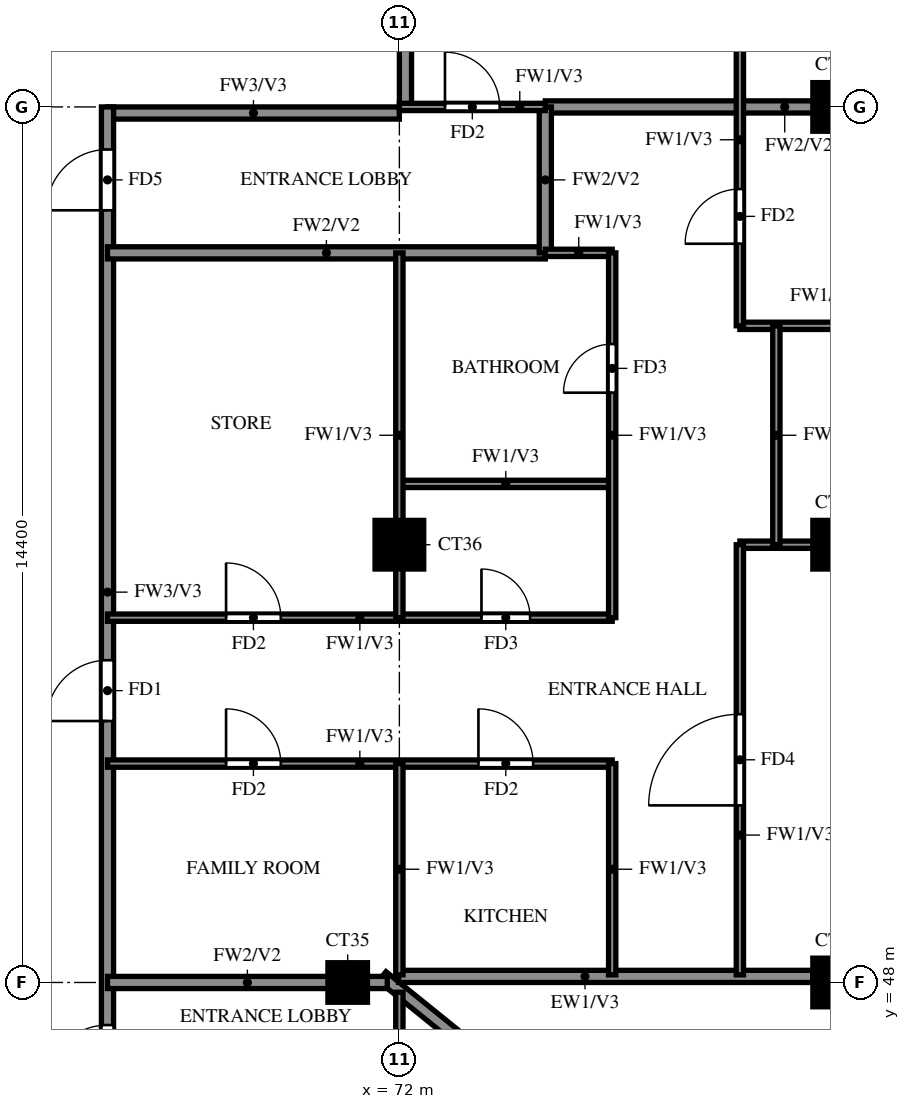
"""IFC4 building model, lengths in metres.
Left out: names, types, materials, properties, quantities, classifications, styles, units other than length and angle.
Written with IfcOpenShell. Run it as: python <this file> out.ifc"""

import sys

from ifc_helpers import new_model, si_unit, direction, frame, frame_2d, origin, origin_2d, place, context, subcontext, project, spatial, rectangle, extrude, source, transform, mapped, element, fill, save


model = new_model("IFC4")
c1 = context("Model", 3, precision=1e-05, world=origin(), true_north=direction((0.0, 1.0)))
c2 = subcontext(c1, "Body", "Model", "MODEL_VIEW")
j1 = project(units=[si_unit("LENGTHUNIT", "METRE"), si_unit("PLANEANGLEUNIT", "RADIAN")], contexts=[c1])
p1 = place(None, origin())
s1 = spatial("IfcSite", under=j1, at=p1, CompositionType="ELEMENT")
p2 = place(p1, origin())
s2 = spatial("IfcBuilding", under=s1, at=p2, CompositionType="ELEMENT")
p3 = place(p2, frame((0.0, 0.0, 232.5)))
s3 = spatial("IfcBuildingStorey", under=s2, at=p3, CompositionType="ELEMENT", Elevation=232.5)
m1 = source(origin(), c2, "Body", "SweptSolid", [
    extrude(rectangle(XDim=0.65, YDim=0.65, at=origin_2d()), origin(), (0.0, 0.0, 1.0), 3.22),
])
p4 = place(p3, frame((71.15, 48.0, 0.0), z_axis=(0.0, 0.0, 1.0), x_axis=(1.0, 0.0, 0.0)))
e1 = element("IfcColumn", 1, at=p4, inside=s3, PredefinedType="COLUMN", context=c2, shape_type="MappedRepresentation", body=[
    mapped(m1, transform((0.0, 0.0, 0.0))),
])
m2 = source(origin(), c2, "Body", "SweptSolid", [
    extrude(rectangle(XDim=0.8, YDim=0.8, at=origin_2d()), origin(), (0.0, 0.0, 1.0), 3.22),
])
for number, where, z_axis, x_axis in (
    (2, (79.2, 48.0, 0.0), (0.0, 0.0, 1.0), (1.0, 0.0, 0.0)),
    (3, (72.0, 55.2, 0.0), (0.0, 0.0, 1.0), (1.0, 0.0, 0.0)),
    (4, (79.2, 55.2, 0.0), (0.0, 0.0, 1.0), (1.0, 0.0, 0.0)),
    (5, (79.2, 62.4, 0.0), (0.0, 0.0, 1.0), (1.0, 0.0, 0.0)),
):
    element("IfcColumn", number, at=place(p3, frame(where, z_axis=z_axis, x_axis=x_axis)), inside=s3, PredefinedType="COLUMN", context=c2, shape_type="MappedRepresentation", body=[
        mapped(m2, transform((0.0, 0.0, 0.0))),
    ])
p5 = place(p3, frame((81.907, 39.87, 0.0), z_axis=(0.0, 0.0, 1.0), x_axis=(-0.777936274417, 0.62834318087, 0.0)))
e6 = element("IfcWall", 6, at=p5, inside=s3, PredefinedType="SOLIDWALL", context=c2, shape_type="SweptSolid", body=[
    extrude(rectangle(XDim=13.099, YDim=0.2, at=frame_2d((6.549, 0.0))), origin(), (0.0, 0.0, 1.0), 3.22),
])
p6 = place(p5, frame((9.938, 0.0, 1.5)))
e7 = element("IfcOpeningElement", 7, at=p6, cuts=e6, PredefinedType="OPENING", context=c2, shape_type="SweptSolid", body=[
    extrude(rectangle(XDim=0.9, YDim=0.9, at=frame_2d((0.45, 0.45))), frame((0.0, 0.11, 0.0), z_axis=(0.0, -1.0, 0.0), x_axis=(1.0, 0.0, 0.0)), (0.0, 0.0, 1.0), 0.22),
])
p7 = place(p3, frame((71.987, 48.1, 0.0), z_axis=(0.0, 0.0, 1.0), x_axis=(1.0, 0.0, 0.0)))
e8 = element("IfcWall", 8, at=p7, inside=s3, PredefinedType="SOLIDWALL", context=c2, shape_type="SweptSolid", body=[
    extrude(rectangle(XDim=6.813, YDim=0.2, at=frame_2d((3.406, 0.0))), origin(), (0.0, 0.0, 1.0), 3.22),
])
p8 = place(p3, frame((67.2, 62.3, 0.0), z_axis=(0.0, 0.0, 1.0), x_axis=(1.0, 0.0, 0.0)))
e9 = element("IfcWall", 9, at=p8, inside=s3, PredefinedType="SOLIDWALL", context=c2, shape_type="SweptSolid", body=[
    extrude(rectangle(XDim=4.8, YDim=0.2, at=frame_2d((2.4, 0.0))), origin(), (0.0, 0.0, 1.0), 3.22),
])
p9 = place(p3, frame((67.2, 45.6, 0.0), z_axis=(0.0, 0.0, 1.0), x_axis=(0.0, 1.0, 0.0)))
e10 = element("IfcWall", 10, at=p9, inside=s3, PredefinedType="SOLIDWALL", context=c2, shape_type="SweptSolid", body=[
    extrude(rectangle(XDim=16.8, YDim=0.2, at=frame_2d((8.4, 0.0))), origin(), (0.0, 0.0, 1.0), 3.22),
])
p10 = place(p9, frame((6.7, 0.0, 0.0)))
e11 = element("IfcOpeningElement", 11, at=p10, cuts=e10, PredefinedType="OPENING", context=c2, shape_type="SweptSolid", body=[
    extrude(rectangle(XDim=1.0, YDim=2.1, at=frame_2d((0.5, 1.05))), frame((0.0, 0.11, 0.0), z_axis=(0.0, -1.0, 0.0), x_axis=(1.0, 0.0, 0.0)), (0.0, 0.0, 1.0), 0.22),
])
p11 = place(p9, frame((15.1, 0.0, 0.0)))
e12 = element("IfcOpeningElement", 12, at=p11, cuts=e10, PredefinedType="OPENING", context=c2, shape_type="SweptSolid", body=[
    extrude(rectangle(XDim=1.0, YDim=2.1, at=frame_2d((0.5, 1.05))), frame((0.0, 0.11, 0.0), z_axis=(0.0, -1.0, 0.0), x_axis=(1.0, 0.0, 0.0)), (0.0, 0.0, 1.0), 0.22),
])
p12 = place(p9, frame((0.7, 0.0, 0.0)))
e13 = element("IfcOpeningElement", 13, at=p12, cuts=e10, PredefinedType="OPENING", context=c2, shape_type="SweptSolid", body=[
    extrude(rectangle(XDim=1.0, YDim=2.1, at=frame_2d((0.5, 1.05))), frame((0.0, 0.11, 0.0), z_axis=(0.0, -1.0, 0.0), x_axis=(1.0, 0.0, 0.0)), (0.0, 0.0, 1.0), 0.22),
])
p13 = place(p3, frame((72.1, 62.4, 0.0), z_axis=(0.0, 0.0, 1.0), x_axis=(0.0, 1.0, 0.0)))
e14 = element("IfcWall", 14, at=p13, inside=s3, PredefinedType="SOLIDWALL", context=c2, shape_type="SweptSolid", body=[
    extrude(rectangle(XDim=15.6, YDim=0.2, at=frame_2d((7.8, 0.0))), origin(), (0.0, 0.0, 1.0), 3.22),
])
p14 = place(p3, frame((67.2, 48.0, 0.0), z_axis=(0.0, 0.0, 1.0), x_axis=(1.0, 0.0, 0.0)))
e15 = element("IfcWall", 15, at=p14, inside=s3, PredefinedType="SOLIDWALL", context=c2, shape_type="SweptSolid", body=[
    extrude(rectangle(XDim=4.601, YDim=0.2, at=frame_2d((2.301, 0.0))), origin(), (0.0, 0.0, 1.0), 3.22),
])
p15 = place(p3, frame((67.2, 60.0, 0.0), z_axis=(0.0, 0.0, 1.0), x_axis=(1.0, 0.0, 0.0)))
e16 = element("IfcWall", 16, at=p15, inside=s3, PredefinedType="SOLIDWALL", context=c2, shape_type="SweptSolid", body=[
    extrude(rectangle(XDim=7.2, YDim=0.2, at=frame_2d((3.6, 0.0))), origin(), (0.0, 0.0, 1.0), 3.22),
])
p16 = place(p3, frame((74.4, 62.4, 0.0), z_axis=(0.0, 0.0, 1.0), x_axis=(1.0, 0.0, 0.0)))
e17 = element("IfcWall", 17, at=p16, inside=s3, PredefinedType="SOLIDWALL", context=c2, shape_type="SweptSolid", body=[
    extrude(rectangle(XDim=7.875, YDim=0.2, at=frame_2d((3.938, 0.0))), origin(), (0.0, 0.0, 1.0), 3.22),
])
p17 = place(p3, frame((74.4, 60.0, 0.0), z_axis=(0.0, 0.0, 1.0), x_axis=(0.0, 1.0, 0.0)))
e18 = element("IfcWall", 18, at=p17, inside=s3, PredefinedType="SOLIDWALL", context=c2, shape_type="SweptSolid", body=[
    extrude(rectangle(XDim=2.4, YDim=0.2, at=frame_2d((1.2, 0.0))), origin(), (0.0, 0.0, 1.0), 3.22),
])
p18 = place(p3, frame((67.2, 51.6, 0.0), z_axis=(0.0, 0.0, 1.0), x_axis=(1.0, 0.0, 0.0)))
e19 = element("IfcWall", 19, at=p18, inside=s3, PredefinedType="PARTITIONING", context=c2, shape_type="SweptSolid", body=[
    extrude(rectangle(XDim=8.3, YDim=0.12, at=frame_2d((4.15, 0.0))), origin(), (0.0, 0.0, 1.0), 3.22),
])
p19 = place(p18, frame((6.1, 0.0, 0.0)))
e20 = element("IfcOpeningElement", 20, at=p19, cuts=e19, PredefinedType="OPENING", context=c2, shape_type="SweptSolid", body=[
    extrude(rectangle(XDim=0.9, YDim=2.1, at=frame_2d((0.45, 1.05))), frame((0.0, 0.07, 0.0), z_axis=(0.0, -1.0, 0.0), x_axis=(1.0, 0.0, 0.0)), (0.0, 0.0, 1.0), 0.14),
])
p20 = place(p18, frame((1.95, 0.0, 0.0)))
e21 = element("IfcOpeningElement", 21, at=p20, cuts=e19, PredefinedType="OPENING", context=c2, shape_type="SweptSolid", body=[
    extrude(rectangle(XDim=0.9, YDim=2.1, at=frame_2d((0.45, 1.05))), frame((0.0, 0.07, 0.0), z_axis=(0.0, -1.0, 0.0), x_axis=(1.0, 0.0, 0.0)), (0.0, 0.0, 1.0), 0.14),
])
p21 = place(p3, frame((67.2, 54.0, 0.0), z_axis=(0.0, 0.0, 1.0), x_axis=(1.0, 0.0, 0.0)))
e22 = element("IfcWall", 22, at=p21, inside=s3, PredefinedType="PARTITIONING", context=c2, shape_type="SweptSolid", body=[
    extrude(rectangle(XDim=8.3, YDim=0.12, at=frame_2d((4.15, 0.0))), origin(), (0.0, 0.0, 1.0), 3.22),
])
p22 = place(p21, frame((6.15, 0.0, 0.0)))
e23 = element("IfcOpeningElement", 23, at=p22, cuts=e22, PredefinedType="OPENING", context=c2, shape_type="SweptSolid", body=[
    extrude(rectangle(XDim=0.8, YDim=2.1, at=frame_2d((0.4, 1.05))), frame((0.0, 0.07, 0.0), z_axis=(0.0, -1.0, 0.0), x_axis=(1.0, 0.0, 0.0)), (0.0, 0.0, 1.0), 0.14),
])
p23 = place(p21, frame((1.95, 0.0, 0.0)))
e24 = element("IfcOpeningElement", 24, at=p23, cuts=e22, PredefinedType="OPENING", context=c2, shape_type="SweptSolid", body=[
    extrude(rectangle(XDim=0.9, YDim=2.1, at=frame_2d((0.45, 1.05))), frame((0.0, 0.07, 0.0), z_axis=(0.0, -1.0, 0.0), x_axis=(1.0, 0.0, 0.0)), (0.0, 0.0, 1.0), 0.14),
])
p24 = place(p3, frame((77.6, 55.2, 0.0), z_axis=(0.0, 0.0, 1.0), x_axis=(1.0, 0.0, 0.0)))
e25 = element("IfcWall", 25, at=p24, inside=s3, PredefinedType="PARTITIONING", context=c2, shape_type="SweptSolid", body=[
    extrude(rectangle(XDim=4.675, YDim=0.12, at=frame_2d((2.337, 0.0))), origin(), (0.0, 0.0, 1.0), 3.22),
])
p25 = place(p3, frame((72.0, 56.2, 0.0), z_axis=(0.0, 0.0, 1.0), x_axis=(1.0, 0.0, 0.0)))
e26 = element("IfcWall", 26, at=p25, inside=s3, PredefinedType="PARTITIONING", context=c2, shape_type="SweptSolid", body=[
    extrude(rectangle(XDim=3.5, YDim=0.12, at=frame_2d((1.75, 0.0))), origin(), (0.0, 0.0, 1.0), 3.22),
])
p26 = place(p3, frame((77.6, 58.8, 0.0), z_axis=(0.0, 0.0, 1.0), x_axis=(1.0, 0.0, 0.0)))
e27 = element("IfcWall", 27, at=p26, inside=s3, PredefinedType="PARTITIONING", context=c2, shape_type="SweptSolid", body=[
    extrude(rectangle(XDim=4.675, YDim=0.12, at=frame_2d((2.337, 0.0))), origin(), (0.0, 0.0, 1.0), 2.32),
])
p27 = place(p26, frame((2.238, 0.0, 0.0)))
e28 = element("IfcOpeningElement", 28, at=p27, cuts=e27, PredefinedType="OPENING", context=c2, shape_type="SweptSolid", body=[
    extrude(rectangle(XDim=0.8, YDim=2.1, at=frame_2d((0.4, 1.05))), frame((0.0, 0.07, 0.0), z_axis=(0.0, -1.0, 0.0), x_axis=(1.0, 0.0, 0.0)), (0.0, 0.0, 1.0), 0.14),
])
p28 = place(p3, frame((74.4, 60.0, 0.0), z_axis=(0.0, 0.0, 1.0), x_axis=(1.0, 0.0, 0.0)))
e29 = element("IfcWall", 29, at=p28, inside=s3, PredefinedType="PARTITIONING", context=c2, shape_type="SweptSolid", body=[
    extrude(rectangle(XDim=1.1, YDim=0.12, at=frame_2d((0.55, 0.0))), origin(), (0.0, 0.0, 1.0), 3.22),
])
p29 = place(p3, frame((72.0, 62.4, 0.0), z_axis=(0.0, 0.0, 1.0), x_axis=(1.0, 0.0, 0.0)))
e30 = element("IfcWall", 30, at=p29, inside=s3, PredefinedType="PARTITIONING", context=c2, shape_type="SweptSolid", body=[
    extrude(rectangle(XDim=2.4, YDim=0.12, at=frame_2d((1.2, 0.0))), origin(), (0.0, 0.0, 1.0), 3.22),
])
p30 = place(p29, frame((0.75, 0.0, 0.0)))
e31 = element("IfcOpeningElement", 31, at=p30, cuts=e30, PredefinedType="OPENING", context=c2, shape_type="SweptSolid", body=[
    extrude(rectangle(XDim=0.9, YDim=2.1, at=frame_2d((0.45, 1.05))), frame((0.0, 0.07, 0.0), z_axis=(0.0, -1.0, 0.0), x_axis=(1.0, 0.0, 0.0)), (0.0, 0.0, 1.0), 0.14),
])
p31 = place(p3, frame((72.0, 39.725, 0.0), z_axis=(0.0, 0.0, 1.0), x_axis=(0.0, 1.0, 0.0)))
e32 = element("IfcWall", 32, at=p31, inside=s3, PredefinedType="PARTITIONING", context=c2, shape_type="SweptSolid", body=[
    extrude(rectangle(XDim=8.114, YDim=0.12, at=frame_2d((4.057, 0.0))), origin(), (0.0, 0.0, 1.0), 2.32),
])
p32 = place(p31, frame((1.788, 0.0, 0.0)))
e33 = element("IfcOpeningElement", 33, at=p32, cuts=e32, PredefinedType="OPENING", context=c2, shape_type="SweptSolid", body=[
    extrude(rectangle(XDim=1.5, YDim=2.1, at=frame_2d((0.75, 1.05))), frame((0.0, 0.07, 0.0), z_axis=(0.0, -1.0, 0.0), x_axis=(1.0, 0.0, 0.0)), (0.0, 0.0, 1.0), 0.14),
])
p33 = place(p31, frame((4.575, 0.0, 0.0)))
e34 = element("IfcOpeningElement", 34, at=p33, cuts=e32, PredefinedType="OPENING", context=c2, shape_type="SweptSolid", body=[
    extrude(rectangle(XDim=0.8, YDim=2.1, at=frame_2d((0.4, 1.05))), frame((0.0, 0.07, 0.0), z_axis=(0.0, -1.0, 0.0), x_axis=(1.0, 0.0, 0.0)), (0.0, 0.0, 1.0), 0.14),
])
p34 = place(p3, frame((72.0, 48.125, 0.0), z_axis=(0.0, 0.0, 1.0), x_axis=(0.0, 1.0, 0.0)))
e35 = element("IfcWall", 35, at=p34, inside=s3, PredefinedType="PARTITIONING", context=c2, shape_type="SweptSolid", body=[
    extrude(rectangle(XDim=3.475, YDim=0.12, at=frame_2d((1.738, 0.0))), origin(), (0.0, 0.0, 1.0), 3.22),
])
p35 = place(p3, frame((72.0, 54.0, 0.0), z_axis=(0.0, 0.0, 1.0), x_axis=(0.0, 1.0, 0.0)))
e36 = element("IfcWall", 36, at=p35, inside=s3, PredefinedType="PARTITIONING", context=c2, shape_type="SweptSolid", body=[
    extrude(rectangle(XDim=6.0, YDim=0.12, at=frame_2d((3.0, 0.0))), origin(), (0.0, 0.0, 1.0), 3.22),
])
p36 = place(p3, frame((75.5, 48.125, 0.0), z_axis=(0.0, 0.0, 1.0), x_axis=(0.0, 1.0, 0.0)))
e37 = element("IfcWall", 37, at=p36, inside=s3, PredefinedType="PARTITIONING", context=c2, shape_type="SweptSolid", body=[
    extrude(rectangle(XDim=3.475, YDim=0.12, at=frame_2d((1.738, 0.0))), origin(), (0.0, 0.0, 1.0), 3.22),
])
p37 = place(p3, frame((75.5, 54.0, 0.0), z_axis=(0.0, 0.0, 1.0), x_axis=(0.0, 1.0, 0.0)))
e38 = element("IfcWall", 38, at=p37, inside=s3, PredefinedType="PARTITIONING", context=c2, shape_type="SweptSolid", body=[
    extrude(rectangle(XDim=6.0, YDim=0.12, at=frame_2d((3.0, 0.0))), origin(), (0.0, 0.0, 1.0), 3.22),
])
p38 = place(p37, frame((3.7, 0.0, 0.0)))
e39 = element("IfcOpeningElement", 39, at=p38, cuts=e38, PredefinedType="OPENING", context=c2, shape_type="SweptSolid", body=[
    extrude(rectangle(XDim=0.8, YDim=2.1, at=frame_2d((0.4, 1.05))), frame((0.0, 0.07, 0.0), z_axis=(0.0, -1.0, 0.0), x_axis=(1.0, 0.0, 0.0)), (0.0, 0.0, 1.0), 0.14),
])
p39 = place(p3, frame((77.6, 48.125, 0.0), z_axis=(0.0, 0.0, 1.0), x_axis=(0.0, 1.0, 0.0)))
e40 = element("IfcWall", 40, at=p39, inside=s3, PredefinedType="PARTITIONING", context=c2, shape_type="SweptSolid", body=[
    extrude(rectangle(XDim=7.075, YDim=0.12, at=frame_2d((3.538, 0.0))), origin(), (0.0, 0.0, 1.0), 3.22),
])
p40 = place(p39, frame((2.788, 0.0, 0.0)))
e41 = element("IfcOpeningElement", 41, at=p40, cuts=e40, PredefinedType="OPENING", context=c2, shape_type="SweptSolid", body=[
    extrude(rectangle(XDim=1.5, YDim=2.1, at=frame_2d((0.75, 1.05))), frame((0.0, 0.07, 0.0), z_axis=(0.0, -1.0, 0.0), x_axis=(1.0, 0.0, 0.0)), (0.0, 0.0, 1.0), 0.14),
])
p41 = place(p3, frame((77.6, 58.8, 0.0), z_axis=(0.0, 0.0, 1.0), x_axis=(0.0, 1.0, 0.0)))
e42 = element("IfcWall", 42, at=p41, inside=s3, PredefinedType="PARTITIONING", context=c2, shape_type="SweptSolid", body=[
    extrude(rectangle(XDim=7.2, YDim=0.12, at=frame_2d((3.6, 0.0))), origin(), (0.0, 0.0, 1.0), 3.22),
])
p42 = place(p41, frame((1.35, 0.0, 0.0)))
e43 = element("IfcOpeningElement", 43, at=p42, cuts=e42, PredefinedType="OPENING", context=c2, shape_type="SweptSolid", body=[
    extrude(rectangle(XDim=0.9, YDim=2.1, at=frame_2d((0.45, 1.05))), frame((0.0, 0.07, 0.0), z_axis=(0.0, -1.0, 0.0), x_axis=(1.0, 0.0, 0.0)), (0.0, 0.0, 1.0), 0.14),
])
p43 = place(p41, frame((4.95, 0.0, 0.0)))
e44 = element("IfcOpeningElement", 44, at=p43, cuts=e42, PredefinedType="OPENING", context=c2, shape_type="SweptSolid", body=[
    extrude(rectangle(XDim=0.9, YDim=2.1, at=frame_2d((0.45, 1.05))), frame((0.0, 0.07, 0.0), z_axis=(0.0, -1.0, 0.0), x_axis=(1.0, 0.0, 0.0)), (0.0, 0.0, 1.0), 0.14),
])
p44 = place(p3, frame((78.2, 55.2, 0.0), z_axis=(0.0, 0.0, 1.0), x_axis=(0.0, 1.0, 0.0)))
e45 = element("IfcWall", 45, at=p44, inside=s3, PredefinedType="PARTITIONING", context=c2, shape_type="SweptSolid", body=[
    extrude(rectangle(XDim=3.6, YDim=0.12, at=frame_2d((1.8, 0.0))), origin(), (0.0, 0.0, 1.0), 3.22),
])
p45 = place(p10, origin())
e46 = element("IfcDoor", 46, at=p45, inside=s3, OperationType="SINGLE_SWING_RIGHT", PredefinedType="DOOR", context=c2, shape_type="SweptSolid", body=[
    extrude(rectangle(XDim=1.0, YDim=2.1, at=frame_2d((0.5, 1.05))), frame((0.0, 0.025, 0.0), z_axis=(0.0, -1.0, 0.0), x_axis=(1.0, 0.0, 0.0)), (0.0, 0.0, 1.0), 0.05),
])
fill(e11, e46)
p46 = place(p40, origin())
e47 = element("IfcDoor", 47, at=p46, inside=s3, OperationType="SINGLE_SWING_LEFT", PredefinedType="DOOR", context=c2, shape_type="SweptSolid", body=[
    extrude(rectangle(XDim=1.5, YDim=2.1, at=frame_2d((0.75, 1.05))), frame((0.0, 0.025, 0.0), z_axis=(0.0, -1.0, 0.0), x_axis=(1.0, 0.0, 0.0)), (0.0, 0.0, 1.0), 0.05),
])
fill(e41, e47)
p47 = place(p42, origin())
e48 = element("IfcDoor", 48, at=p47, inside=s3, OperationType="SINGLE_SWING_LEFT", PredefinedType="DOOR", context=c2, shape_type="SweptSolid", body=[
    extrude(rectangle(XDim=0.9, YDim=2.1, at=frame_2d((0.45, 1.05))), frame((0.0, 0.025, 0.0), z_axis=(0.0, -1.0, 0.0), x_axis=(1.0, 0.0, 0.0)), (0.0, 0.0, 1.0), 0.05),
])
fill(e43, e48)
p48 = place(p19, origin())
e49 = element("IfcDoor", 49, at=p48, inside=s3, OperationType="SINGLE_SWING_LEFT", PredefinedType="DOOR", context=c2, shape_type="SweptSolid", body=[
    extrude(rectangle(XDim=0.9, YDim=2.1, at=frame_2d((0.45, 1.05))), frame((0.0, 0.025, 0.0), z_axis=(0.0, -1.0, 0.0), x_axis=(1.0, 0.0, 0.0)), (0.0, 0.0, 1.0), 0.05),
])
fill(e20, e49)
p49 = place(p22, origin())
e50 = element("IfcDoor", 50, at=p49, inside=s3, OperationType="SINGLE_SWING_LEFT", PredefinedType="DOOR", context=c2, shape_type="SweptSolid", body=[
    extrude(rectangle(XDim=0.8, YDim=2.1, at=frame_2d((0.4, 1.05))), frame((0.0, 0.025, 0.0), z_axis=(0.0, -1.0, 0.0), x_axis=(1.0, 0.0, 0.0)), (0.0, 0.0, 1.0), 0.05),
])
fill(e23, e50)
p50 = place(p38, origin())
e51 = element("IfcDoor", 51, at=p50, inside=s3, OperationType="SINGLE_SWING_RIGHT", PredefinedType="DOOR", context=c2, shape_type="SweptSolid", body=[
    extrude(rectangle(XDim=0.8, YDim=2.1, at=frame_2d((0.4, 1.05))), frame((0.0, 0.025, 0.0), z_axis=(0.0, -1.0, 0.0), x_axis=(1.0, 0.0, 0.0)), (0.0, 0.0, 1.0), 0.05),
])
fill(e39, e51)
p51 = place(p20, origin())
e52 = element("IfcDoor", 52, at=p51, inside=s3, OperationType="SINGLE_SWING_LEFT", PredefinedType="DOOR", context=c2, shape_type="SweptSolid", body=[
    extrude(rectangle(XDim=0.9, YDim=2.1, at=frame_2d((0.45, 1.05))), frame((0.0, 0.025, 0.0), z_axis=(0.0, -1.0, 0.0), x_axis=(1.0, 0.0, 0.0)), (0.0, 0.0, 1.0), 0.05),
])
fill(e21, e52)
p52 = place(p23, origin())
e53 = element("IfcDoor", 53, at=p52, inside=s3, OperationType="SINGLE_SWING_LEFT", PredefinedType="DOOR", context=c2, shape_type="SweptSolid", body=[
    extrude(rectangle(XDim=0.9, YDim=2.1, at=frame_2d((0.45, 1.05))), frame((0.0, 0.025, 0.0), z_axis=(0.0, -1.0, 0.0), x_axis=(1.0, 0.0, 0.0)), (0.0, 0.0, 1.0), 0.05),
])
fill(e24, e53)
p53 = place(p30, origin())
e54 = element("IfcDoor", 54, at=p53, inside=s3, OperationType="SINGLE_SWING_LEFT", PredefinedType="DOOR", context=c2, shape_type="SweptSolid", body=[
    extrude(rectangle(XDim=0.9, YDim=2.1, at=frame_2d((0.45, 1.05))), frame((0.0, 0.025, 0.0), z_axis=(0.0, -1.0, 0.0), x_axis=(1.0, 0.0, 0.0)), (0.0, 0.0, 1.0), 0.05),
])
fill(e31, e54)
p54 = place(p11, origin())
e55 = element("IfcDoor", 55, at=p54, inside=s3, OperationType="SINGLE_SWING_LEFT", PredefinedType="DOOR", context=c2, shape_type="SweptSolid", body=[
    extrude(rectangle(XDim=1.0, YDim=2.1, at=frame_2d((0.5, 1.05))), frame((0.0, 0.025, 0.0), z_axis=(0.0, -1.0, 0.0), x_axis=(1.0, 0.0, 0.0)), (0.0, 0.0, 1.0), 0.05),
])
fill(e12, e55)
p55 = place(p12, origin())
e56 = element("IfcDoor", 56, at=p55, inside=s3, OperationType="SINGLE_SWING_LEFT", PredefinedType="DOOR", context=c2, shape_type="SweptSolid", body=[
    extrude(rectangle(XDim=1.0, YDim=2.1, at=frame_2d((0.5, 1.05))), frame((0.0, 0.025, 0.0), z_axis=(0.0, -1.0, 0.0), x_axis=(1.0, 0.0, 0.0)), (0.0, 0.0, 1.0), 0.05),
])
fill(e13, e56)
save(model, sys.argv[1])
